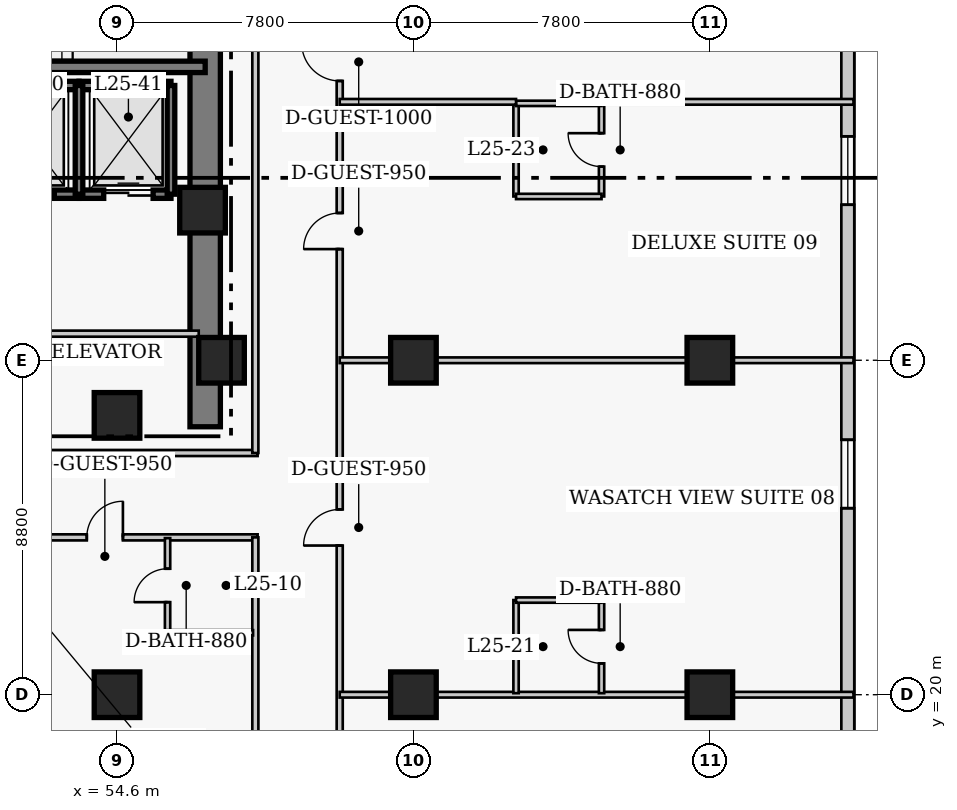
"""IFC4 building model, lengths in metres.
Left out: names, types, materials, properties, quantities, classifications, styles, units other than length and angle.
Written with IfcOpenShell. Run it as: python <this file> out.ifc"""

import sys

from ifc_helpers import new_model, si_unit, direction, frame, frame_2d, origin, origin_2d, place, context, subcontext, project, spatial, rectangle, extrude, element, fill, save


model = new_model("IFC4")
c1 = context("Model", 3, precision=1e-05, world=origin(), true_north=direction((0.0, 1.0)))
c2 = subcontext(c1, "Body", "Model", "MODEL_VIEW")
j1 = project(units=[si_unit("LENGTHUNIT", "METRE"), si_unit("PLANEANGLEUNIT", "RADIAN")], contexts=[c1])
p1 = place(None, origin())
s1 = spatial("IfcSite", under=j1, at=p1, CompositionType="ELEMENT")
p2 = place(p1, origin())
s2 = spatial("IfcBuilding", under=s1, at=p2, CompositionType="ELEMENT")
p3 = place(p2, frame((0.0, 0.0, 103.2)))
s3 = spatial("IfcBuildingStorey", under=s2, at=p3, CompositionType="ELEMENT", Elevation=103.2)
p4 = place(p3, frame((56.92, 27.05, 0.0), z_axis=(0.0, 0.0, 1.0), x_axis=(0.0, 1.0, 0.0)))
e1 = element("IfcWall", 1, at=p4, inside=s3, PredefinedType="SHEAR", context=c2, shape_type="SweptSolid", body=[
    extrude(rectangle(XDim=13.67, YDim=0.8, at=frame_2d((6.835, 0.0))), origin(), (0.0, 0.0, 1.0), 3.8),
])
p5 = place(p3, frame((48.45, 36.52, 0.0), z_axis=(0.0, 0.0, 1.0), x_axis=(1.0, 0.0, 0.0)))
e2 = element("IfcWall", 2, at=p5, inside=s3, PredefinedType="SHEAR", context=c2, shape_type="SweptSolid", body=[
    extrude(rectangle(XDim=8.47, YDim=0.3, at=frame_2d((4.235, 0.0))), origin(), (0.0, 0.0, 1.0), 3.8),
])
for number, where, z_axis, x_axis in (
    (3, (54.6, 20.0, 0.0), (0.0, 0.0, 1.0), (1.0, 0.0, 0.0)),
    (4, (62.4, 20.0, 0.0), (0.0, 0.0, 1.0), (1.0, 0.0, 0.0)),
    (5, (62.4, 28.8, 0.0), (0.0, 0.0, 1.0), (1.0, 0.0, 0.0)),
    (6, (70.2, 20.0, 0.0), (0.0, 0.0, 1.0), (1.0, 0.0, 0.0)),
    (7, (70.2, 28.8, 0.0), (0.0, 0.0, 1.0), (1.0, 0.0, 0.0)),
    (8, (57.35, 28.8, 0.0), (0.0, 0.0, 1.0), (1.0, 0.0, 0.0)),
    (9, (54.6, 27.35, 0.0), (0.0, 0.0, 1.0), (1.0, 0.0, 0.0)),
    (10, (56.85, 32.75, 0.0), (0.0, 0.0, 1.0), (1.0, 0.0, 0.0)),
):
    element("IfcColumn", number, at=place(p3, frame(where, z_axis=z_axis, x_axis=x_axis)), inside=s3, PredefinedType="COLUMN", context=c2, shape_type="SweptSolid", body=[
        extrude(rectangle(XDim=1.2, YDim=1.2, at=origin_2d()), origin(), (0.0, 0.0, 1.0), 3.8),
    ])
p6 = place(p3, frame((73.83, 13.83, 0.0), z_axis=(0.0, 0.0, 1.0), x_axis=(0.0, 1.0, 0.0)))
e11 = element("IfcWall", 11, at=p6, inside=s3, PredefinedType="SOLIDWALL", context=c2, shape_type="SweptSolid", body=[
    extrude(rectangle(XDim=31.94, YDim=0.34, at=frame_2d((15.97, 0.0))), origin(), (0.0, 0.0, 1.0), 3.54),
])
p7 = place(p6, frame((3.093, 0.0, 0.85)))
e12 = element("IfcOpeningElement", 12, at=p7, cuts=e11, PredefinedType="OPENING", context=c2, shape_type="SweptSolid", body=[
    extrude(rectangle(XDim=1.8, YDim=1.8, at=frame_2d((0.9, 0.9))), frame((0.0, 0.18, 0.0), z_axis=(0.0, -1.0, 0.0), x_axis=(1.0, 0.0, 0.0)), (0.0, 0.0, 1.0), 0.36),
])
p8 = place(p6, frame((11.077, 0.0, 0.85)))
e13 = element("IfcOpeningElement", 13, at=p8, cuts=e11, PredefinedType="OPENING", context=c2, shape_type="SweptSolid", body=[
    extrude(rectangle(XDim=1.8, YDim=1.8, at=frame_2d((0.9, 0.9))), frame((0.0, 0.18, 0.0), z_axis=(0.0, -1.0, 0.0), x_axis=(1.0, 0.0, 0.0)), (0.0, 0.0, 1.0), 0.36),
])
p9 = place(p6, frame((19.062, 0.0, 0.85)))
e14 = element("IfcOpeningElement", 14, at=p9, cuts=e11, PredefinedType="OPENING", context=c2, shape_type="SweptSolid", body=[
    extrude(rectangle(XDim=1.8, YDim=1.8, at=frame_2d((0.9, 0.9))), frame((0.0, 0.18, 0.0), z_axis=(0.0, -1.0, 0.0), x_axis=(1.0, 0.0, 0.0)), (0.0, 0.0, 1.0), 0.36),
])
p10 = place(p6, frame((27.048, 0.0, 0.85)))
e15 = element("IfcOpeningElement", 15, at=p10, cuts=e11, PredefinedType="OPENING", context=c2, shape_type="SweptSolid", body=[
    extrude(rectangle(XDim=1.8, YDim=1.8, at=frame_2d((0.9, 0.9))), frame((0.0, 0.18, 0.0), z_axis=(0.0, -1.0, 0.0), x_axis=(1.0, 0.0, 0.0)), (0.0, 0.0, 1.0), 0.36),
])
p11 = place(p3, frame((51.18, 36.03, 0.0), z_axis=(0.0, 0.0, 1.0), x_axis=(1.0, 0.0, 0.0)))
e16 = element("IfcWall", 16, at=p11, inside=s3, PredefinedType="SHEAR", context=c2, shape_type="SweptSolid", body=[
    extrude(rectangle(XDim=2.42, YDim=0.22, at=frame_2d((1.21, 0.0))), origin(), (0.0, 0.0, 1.0), 3.8),
])
p12 = place(p3, frame((51.18, 33.17, 0.0), z_axis=(0.0, 0.0, 1.0), x_axis=(1.0, 0.0, 0.0)))
e17 = element("IfcWall", 17, at=p12, inside=s3, PredefinedType="SHEAR", context=c2, shape_type="SweptSolid", body=[
    extrude(rectangle(XDim=2.42, YDim=0.22, at=frame_2d((1.21, 0.0))), origin(), (0.0, 0.0, 1.0), 3.8),
])
p13 = place(p12, frame((0.47, 0.0, 0.0)))
e18 = element("IfcOpeningElement", 18, at=p13, cuts=e17, PredefinedType="OPENING", context=c2, shape_type="SweptSolid", body=[
    extrude(rectangle(XDim=1.3, YDim=2.15, at=frame_2d((0.65, 1.075))), frame((0.0, 0.12, 0.0), z_axis=(0.0, -1.0, 0.0), x_axis=(1.0, 0.0, 0.0)), (0.0, 0.0, 1.0), 0.24),
])
p14 = place(p3, frame((53.6, 36.03, 0.0), z_axis=(0.0, 0.0, 1.0), x_axis=(1.0, 0.0, 0.0)))
e19 = element("IfcWall", 19, at=p14, inside=s3, PredefinedType="SHEAR", context=c2, shape_type="SweptSolid", body=[
    extrude(rectangle(XDim=2.42, YDim=0.22, at=frame_2d((1.21, 0.0))), origin(), (0.0, 0.0, 1.0), 3.8),
])
p15 = place(p3, frame((53.6, 33.17, 0.0), z_axis=(0.0, 0.0, 1.0), x_axis=(1.0, 0.0, 0.0)))
e20 = element("IfcWall", 20, at=p15, inside=s3, PredefinedType="SHEAR", context=c2, shape_type="SweptSolid", body=[
    extrude(rectangle(XDim=2.42, YDim=0.22, at=frame_2d((1.21, 0.0))), origin(), (0.0, 0.0, 1.0), 3.8),
])
p16 = place(p15, frame((0.65, 0.0, 0.0)))
e21 = element("IfcOpeningElement", 21, at=p16, cuts=e20, PredefinedType="OPENING", context=c2, shape_type="SweptSolid", body=[
    extrude(rectangle(XDim=1.3, YDim=2.15, at=frame_2d((0.65, 1.075))), frame((0.0, 0.12, 0.0), z_axis=(0.0, -1.0, 0.0), x_axis=(1.0, 0.0, 0.0)), (0.0, 0.0, 1.0), 0.24),
])
for number, where, z_axis, x_axis in (
    (22, (53.6, 33.17, 0.0), (0.0, 0.0, 1.0), (0.0, 1.0, 0.0)),
    (23, (56.02, 33.17, 0.0), (0.0, 0.0, 1.0), (0.0, 1.0, 0.0)),
):
    element("IfcWall", number, at=place(p3, frame(where, z_axis=z_axis, x_axis=x_axis)), inside=s3, PredefinedType="SHEAR", context=c2, shape_type="SweptSolid", body=[
        extrude(rectangle(XDim=2.86, YDim=0.2, at=frame_2d((1.43, 0.0))), origin(), (0.0, 0.0, 1.0), 3.8),
    ])
p17 = place(p3, frame((51.12, 29.5, 0.0), z_axis=(0.0, 0.0, 1.0), x_axis=(1.0, 0.0, 0.0)))
e24 = element("IfcWall", 24, at=p17, inside=s3, PredefinedType="PARTITIONING", context=c2, shape_type="SweptSolid", body=[
    extrude(rectangle(XDim=5.63, YDim=0.16, at=frame_2d((2.815, 0.0))), origin(), (0.0, 0.0, 1.0), 3.54),
])
p18 = place(p3, frame((35.85, 26.36, 0.0), z_axis=(0.0, 0.0, 1.0), x_axis=(1.0, 0.0, 0.0)))
e25 = element("IfcWall", 25, at=p18, inside=s3, PredefinedType="PARTITIONING", context=c2, shape_type="SweptSolid", body=[
    extrude(rectangle(XDim=22.45, YDim=0.16, at=frame_2d((11.225, 0.0))), origin(), (0.0, 0.0, 1.0), 3.54),
])
p19 = place(p3, frame((35.8, 24.14, 0.0), z_axis=(0.0, 0.0, 1.0), x_axis=(1.0, 0.0, 0.0)))
e26 = element("IfcWall", 26, at=p19, inside=s3, PredefinedType="PARTITIONING", context=c2, shape_type="SweptSolid", body=[
    extrude(rectangle(XDim=22.5, YDim=0.16, at=frame_2d((11.25, 0.0))), origin(), (0.0, 0.0, 1.0), 3.54),
])
p20 = place(p19, frame((2.305, 0.0, 0.0)))
e27 = element("IfcOpeningElement", 27, at=p20, cuts=e26, PredefinedType="OPENING", context=c2, shape_type="SweptSolid", body=[
    extrude(rectangle(XDim=1.0, YDim=2.15, at=frame_2d((0.5, 1.075))), frame((0.0, 0.09, 0.0), z_axis=(0.0, -1.0, 0.0), x_axis=(1.0, 0.0, 0.0)), (0.0, 0.0, 1.0), 0.18),
])
p21 = place(p19, frame((9.095, 0.0, 0.0)))
e28 = element("IfcOpeningElement", 28, at=p21, cuts=e26, PredefinedType="OPENING", context=c2, shape_type="SweptSolid", body=[
    extrude(rectangle(XDim=0.95, YDim=2.1, at=frame_2d((0.475, 1.05))), frame((0.0, 0.09, 0.0), z_axis=(0.0, -1.0, 0.0), x_axis=(1.0, 0.0, 0.0)), (0.0, 0.0, 1.0), 0.18),
])
p22 = place(p19, frame((12.395, 0.0, 0.0)))
e29 = element("IfcOpeningElement", 29, at=p22, cuts=e26, PredefinedType="OPENING", context=c2, shape_type="SweptSolid", body=[
    extrude(rectangle(XDim=0.95, YDim=2.1, at=frame_2d((0.475, 1.05))), frame((0.0, 0.09, 0.0), z_axis=(0.0, -1.0, 0.0), x_axis=(1.0, 0.0, 0.0)), (0.0, 0.0, 1.0), 0.18),
])
p23 = place(p19, frame((18.005, 0.0, 0.0)))
e30 = element("IfcOpeningElement", 30, at=p23, cuts=e26, PredefinedType="OPENING", context=c2, shape_type="SweptSolid", body=[
    extrude(rectangle(XDim=0.95, YDim=2.1, at=frame_2d((0.475, 1.05))), frame((0.0, 0.09, 0.0), z_axis=(0.0, -1.0, 0.0), x_axis=(1.0, 0.0, 0.0)), (0.0, 0.0, 1.0), 0.18),
])
p24 = place(p3, frame((60.46, 11.85, 0.0), z_axis=(0.0, 0.0, 1.0), x_axis=(0.0, 1.0, 0.0)))
e31 = element("IfcWall", 31, at=p24, inside=s3, PredefinedType="PARTITIONING", context=c2, shape_type="SweptSolid", body=[
    extrude(rectangle(XDim=28.8, YDim=0.16, at=frame_2d((14.4, 0.0))), origin(), (0.0, 0.0, 1.0), 3.54),
])
p25 = place(p24, frame((3.6, 0.0, 0.0)))
e32 = element("IfcOpeningElement", 32, at=p25, cuts=e31, PredefinedType="OPENING", context=c2, shape_type="SweptSolid", body=[
    extrude(rectangle(XDim=0.95, YDim=2.1, at=frame_2d((0.475, 1.05))), frame((0.0, 0.09, 0.0), z_axis=(0.0, -1.0, 0.0), x_axis=(1.0, 0.0, 0.0)), (0.0, 0.0, 1.0), 0.18),
])
p26 = place(p24, frame((12.075, 0.0, 0.0)))
e33 = element("IfcOpeningElement", 33, at=p26, cuts=e31, PredefinedType="OPENING", context=c2, shape_type="SweptSolid", body=[
    extrude(rectangle(XDim=0.95, YDim=2.1, at=frame_2d((0.475, 1.05))), frame((0.0, 0.09, 0.0), z_axis=(0.0, -1.0, 0.0), x_axis=(1.0, 0.0, 0.0)), (0.0, 0.0, 1.0), 0.18),
])
p27 = place(p24, frame((19.875, 0.0, 0.0)))
e34 = element("IfcOpeningElement", 34, at=p27, cuts=e31, PredefinedType="OPENING", context=c2, shape_type="SweptSolid", body=[
    extrude(rectangle(XDim=0.95, YDim=2.1, at=frame_2d((0.475, 1.05))), frame((0.0, 0.09, 0.0), z_axis=(0.0, -1.0, 0.0), x_axis=(1.0, 0.0, 0.0)), (0.0, 0.0, 1.0), 0.18),
])
p28 = place(p24, frame((24.3, 0.0, 0.0)))
e35 = element("IfcOpeningElement", 35, at=p28, cuts=e31, PredefinedType="OPENING", context=c2, shape_type="SweptSolid", body=[
    extrude(rectangle(XDim=1.0, YDim=2.15, at=frame_2d((0.5, 1.075))), frame((0.0, 0.09, 0.0), z_axis=(0.0, -1.0, 0.0), x_axis=(1.0, 0.0, 0.0)), (0.0, 0.0, 1.0), 0.18),
])
p29 = place(p3, frame((58.24, 26.36, 0.0), z_axis=(0.0, 0.0, 1.0), x_axis=(0.0, 1.0, 0.0)))
e36 = element("IfcWall", 36, at=p29, inside=s3, PredefinedType="PARTITIONING", context=c2, shape_type="SweptSolid", body=[
    extrude(rectangle(XDim=14.29, YDim=0.16, at=frame_2d((7.145, 0.0))), origin(), (0.0, 0.0, 1.0), 3.54),
])
p30 = place(p3, frame((58.24, 11.85, 0.0), z_axis=(0.0, 0.0, 1.0), x_axis=(0.0, 1.0, 0.0)))
e37 = element("IfcWall", 37, at=p30, inside=s3, PredefinedType="PARTITIONING", context=c2, shape_type="SweptSolid", body=[
    extrude(rectangle(XDim=12.29, YDim=0.16, at=frame_2d((6.145, 0.0))), origin(), (0.0, 0.0, 1.0), 3.54),
])
p31 = place(p3, frame((55.93, 21.63, 0.0), z_axis=(0.0, 0.0, 1.0), x_axis=(0.0, 1.0, 0.0)))
e38 = element("IfcWall", 38, at=p31, inside=s3, PredefinedType="PLUMBINGWALL", context=c2, shape_type="SweptSolid", body=[
    extrude(rectangle(XDim=2.49, YDim=0.14, at=frame_2d((1.245, 0.0))), origin(), (0.0, 0.0, 1.0), 3.54),
])
p32 = place(p31, frame((0.805, 0.0, 0.0)))
e39 = element("IfcOpeningElement", 39, at=p32, cuts=e38, PredefinedType="OPENING", context=c2, shape_type="SweptSolid", body=[
    extrude(rectangle(XDim=0.88, YDim=2.05, at=frame_2d((0.44, 1.025))), frame((0.0, 0.08, 0.0), z_axis=(0.0, -1.0, 0.0), x_axis=(1.0, 0.0, 0.0)), (0.0, 0.0, 1.0), 0.16),
])
p33 = place(p3, frame((55.93, 21.63, 0.0), z_axis=(0.0, 0.0, 1.0), x_axis=(1.0, 0.0, 0.0)))
e40 = element("IfcWall", 40, at=p33, inside=s3, PredefinedType="PLUMBINGWALL", context=c2, shape_type="SweptSolid", body=[
    extrude(rectangle(XDim=2.25, YDim=0.14, at=frame_2d((1.125, 0.0))), origin(), (0.0, 0.0, 1.0), 3.54),
])
p34 = place(p3, frame((60.46, 20.0, 0.0), z_axis=(0.0, 0.0, 1.0), x_axis=(1.0, 0.0, 0.0)))
e41 = element("IfcWall", 41, at=p34, inside=s3, PredefinedType="PARTITIONING", context=c2, shape_type="SweptSolid", body=[
    extrude(rectangle(XDim=13.52, YDim=0.15, at=frame_2d((6.76, 0.0))), origin(), (0.0, 0.0, 1.0), 2.679),
])
p35 = place(p3, frame((65.1, 20.04, 0.0), z_axis=(0.0, 0.0, 1.0), x_axis=(0.0, 1.0, 0.0)))
e42 = element("IfcWall", 42, at=p35, inside=s3, PredefinedType="PLUMBINGWALL", context=c2, shape_type="SweptSolid", body=[
    extrude(rectangle(XDim=2.45, YDim=0.14, at=frame_2d((1.225, 0.0))), origin(), (0.0, 0.0, 1.0), 3.54),
])
p36 = place(p3, frame((67.35, 20.04, 0.0), z_axis=(0.0, 0.0, 1.0), x_axis=(0.0, 1.0, 0.0)))
e43 = element("IfcWall", 43, at=p36, inside=s3, PredefinedType="PLUMBINGWALL", context=c2, shape_type="SweptSolid", body=[
    extrude(rectangle(XDim=2.45, YDim=0.14, at=frame_2d((1.225, 0.0))), origin(), (0.0, 0.0, 1.0), 3.54),
])
p37 = place(p36, frame((0.785, 0.0, 0.0)))
e44 = element("IfcOpeningElement", 44, at=p37, cuts=e43, PredefinedType="OPENING", context=c2, shape_type="SweptSolid", body=[
    extrude(rectangle(XDim=0.88, YDim=2.05, at=frame_2d((0.44, 1.025))), frame((0.0, 0.08, 0.0), z_axis=(0.0, -1.0, 0.0), x_axis=(1.0, 0.0, 0.0)), (0.0, 0.0, 1.0), 0.16),
])
p38 = place(p3, frame((65.1, 22.49, 0.0), z_axis=(0.0, 0.0, 1.0), x_axis=(1.0, 0.0, 0.0)))
e45 = element("IfcWall", 45, at=p38, inside=s3, PredefinedType="PLUMBINGWALL", context=c2, shape_type="SweptSolid", body=[
    extrude(rectangle(XDim=2.25, YDim=0.14, at=frame_2d((1.125, 0.0))), origin(), (0.0, 0.0, 1.0), 3.54),
])
p39 = place(p3, frame((60.46, 28.8, 0.0), z_axis=(0.0, 0.0, 1.0), x_axis=(1.0, 0.0, 0.0)))
e46 = element("IfcWall", 46, at=p39, inside=s3, PredefinedType="PARTITIONING", context=c2, shape_type="SweptSolid", body=[
    extrude(rectangle(XDim=13.52, YDim=0.15, at=frame_2d((6.76, 0.0))), origin(), (0.0, 0.0, 1.0), 2.679),
])
p40 = place(p3, frame((65.1, 33.11, 0.0), z_axis=(0.0, 0.0, 1.0), x_axis=(0.0, 1.0, 0.0)))
e47 = element("IfcWall", 47, at=p40, inside=s3, PredefinedType="PLUMBINGWALL", context=c2, shape_type="SweptSolid", body=[
    extrude(rectangle(XDim=2.45, YDim=0.14, at=frame_2d((1.225, 0.0))), origin(), (0.0, 0.0, 1.0), 3.54),
])
p41 = place(p3, frame((67.35, 33.11, 0.0), z_axis=(0.0, 0.0, 1.0), x_axis=(0.0, 1.0, 0.0)))
e48 = element("IfcWall", 48, at=p41, inside=s3, PredefinedType="PLUMBINGWALL", context=c2, shape_type="SweptSolid", body=[
    extrude(rectangle(XDim=2.45, YDim=0.14, at=frame_2d((1.225, 0.0))), origin(), (0.0, 0.0, 1.0), 3.54),
])
p42 = place(p41, frame((0.785, 0.0, 0.0)))
e49 = element("IfcOpeningElement", 49, at=p42, cuts=e48, PredefinedType="OPENING", context=c2, shape_type="SweptSolid", body=[
    extrude(rectangle(XDim=0.88, YDim=2.05, at=frame_2d((0.44, 1.025))), frame((0.0, 0.08, 0.0), z_axis=(0.0, -1.0, 0.0), x_axis=(1.0, 0.0, 0.0)), (0.0, 0.0, 1.0), 0.16),
])
for number, where, z_axis, x_axis in (
    (50, (65.1, 33.11, 0.0), (0.0, 0.0, 1.0), (1.0, 0.0, 0.0)),
    (51, (65.1, 35.56, 0.0), (0.0, 0.0, 1.0), (1.0, 0.0, 0.0)),
):
    element("IfcWall", number, at=place(p3, frame(where, z_axis=z_axis, x_axis=x_axis)), inside=s3, PredefinedType="PLUMBINGWALL", context=c2, shape_type="SweptSolid", body=[
        extrude(rectangle(XDim=2.25, YDim=0.14, at=frame_2d((1.125, 0.0))), origin(), (0.0, 0.0, 1.0), 3.54),
    ])
p43 = place(p3, frame((60.46, 35.6, 0.0), z_axis=(0.0, 0.0, 1.0), x_axis=(1.0, 0.0, 0.0)))
e52 = element("IfcWall", 52, at=p43, inside=s3, PredefinedType="PARTITIONING", context=c2, shape_type="SweptSolid", body=[
    extrude(rectangle(XDim=4.64, YDim=0.15, at=frame_2d((2.32, 0.0))), origin(), (0.0, 0.0, 1.0), 3.54),
])
p44 = place(p3, frame((67.35, 35.6, 0.0), z_axis=(0.0, 0.0, 1.0), x_axis=(1.0, 0.0, 0.0)))
e53 = element("IfcWall", 53, at=p44, inside=s3, PredefinedType="PARTITIONING", context=c2, shape_type="SweptSolid", body=[
    extrude(rectangle(XDim=6.63, YDim=0.15, at=frame_2d((3.315, 0.0))), origin(), (0.0, 0.0, 1.0), 3.54),
])
p45 = place(p8, origin())
e54 = element("IfcWindow", 54, at=p45, inside=s3, PartitioningType="SINGLE_PANEL", PredefinedType="WINDOW", context=c2, shape_type="SweptSolid", body=[
    extrude(rectangle(XDim=1.8, YDim=1.8, at=frame_2d((0.9, 0.9))), frame((0.0, 0.03, 0.0), z_axis=(0.0, -1.0, 0.0), x_axis=(1.0, 0.0, 0.0)), (0.0, 0.0, 1.0), 0.06),
])
fill(e13, e54)
p46 = place(p9, origin())
e55 = element("IfcWindow", 55, at=p46, inside=s3, PartitioningType="SINGLE_PANEL", PredefinedType="WINDOW", context=c2, shape_type="SweptSolid", body=[
    extrude(rectangle(XDim=1.8, YDim=1.8, at=frame_2d((0.9, 0.9))), frame((0.0, 0.03, 0.0), z_axis=(0.0, -1.0, 0.0), x_axis=(1.0, 0.0, 0.0)), (0.0, 0.0, 1.0), 0.06),
])
fill(e14, e55)
p47 = place(p13, origin())
e56 = element("IfcDoor", 56, at=p47, inside=s3, OperationType="DOUBLE_DOOR_SLIDING", PredefinedType="DOOR", context=c2, shape_type="SweptSolid", body=[
    extrude(rectangle(XDim=1.3, YDim=2.15, at=frame_2d((0.65, 1.075))), frame((0.0, 0.025, 0.0), z_axis=(0.0, -1.0, 0.0), x_axis=(1.0, 0.0, 0.0)), (0.0, 0.0, 1.0), 0.05),
])
fill(e18, e56)
p48 = place(p16, origin())
e57 = element("IfcDoor", 57, at=p48, inside=s3, OperationType="DOUBLE_DOOR_SLIDING", PredefinedType="DOOR", context=c2, shape_type="SweptSolid", body=[
    extrude(rectangle(XDim=1.3, YDim=2.15, at=frame_2d((0.65, 1.075))), frame((0.0, 0.025, 0.0), z_axis=(0.0, -1.0, 0.0), x_axis=(1.0, 0.0, 0.0)), (0.0, 0.0, 1.0), 0.05),
])
fill(e21, e57)
p49 = place(p32, origin())
e58 = element("IfcDoor", 58, at=p49, inside=s3, OperationType="SINGLE_SWING_LEFT", PredefinedType="DOOR", context=c2, shape_type="SweptSolid", body=[
    extrude(rectangle(XDim=0.88, YDim=2.05, at=frame_2d((0.44, 1.025))), frame((0.0, 0.025, 0.0), z_axis=(0.0, -1.0, 0.0), x_axis=(1.0, 0.0, 0.0)), (0.0, 0.0, 1.0), 0.05),
])
fill(e39, e58)
p50 = place(p23, origin())
e59 = element("IfcDoor", 59, at=p50, inside=s3, OperationType="SINGLE_SWING_RIGHT", PredefinedType="DOOR", context=c2, shape_type="SweptSolid", body=[
    extrude(rectangle(XDim=0.95, YDim=2.1, at=frame_2d((0.475, 1.05))), frame((0.0, 0.025, 0.0), z_axis=(0.0, -1.0, 0.0), x_axis=(1.0, 0.0, 0.0)), (0.0, 0.0, 1.0), 0.05),
])
fill(e30, e59)
p51 = place(p37, origin())
e60 = element("IfcDoor", 60, at=p51, inside=s3, OperationType="SINGLE_SWING_RIGHT", PredefinedType="DOOR", context=c2, shape_type="SweptSolid", body=[
    extrude(rectangle(XDim=0.88, YDim=2.05, at=frame_2d((0.44, 1.025))), frame((0.0, 0.025, 0.0), z_axis=(0.0, -1.0, 0.0), x_axis=(1.0, 0.0, 0.0)), (0.0, 0.0, 1.0), 0.05),
])
fill(e44, e60)
p52 = place(p26, origin())
e61 = element("IfcDoor", 61, at=p52, inside=s3, OperationType="SINGLE_SWING_LEFT", PredefinedType="DOOR", context=c2, shape_type="SweptSolid", body=[
    extrude(rectangle(XDim=0.95, YDim=2.1, at=frame_2d((0.475, 1.05))), frame((0.0, 0.025, 0.0), z_axis=(0.0, -1.0, 0.0), x_axis=(1.0, 0.0, 0.0)), (0.0, 0.0, 1.0), 0.05),
])
fill(e33, e61)
p53 = place(p42, origin())
e62 = element("IfcDoor", 62, at=p53, inside=s3, OperationType="SINGLE_SWING_RIGHT", PredefinedType="DOOR", context=c2, shape_type="SweptSolid", body=[
    extrude(rectangle(XDim=0.88, YDim=2.05, at=frame_2d((0.44, 1.025))), frame((0.0, 0.025, 0.0), z_axis=(0.0, -1.0, 0.0), x_axis=(1.0, 0.0, 0.0)), (0.0, 0.0, 1.0), 0.05),
])
fill(e49, e62)
p54 = place(p27, origin())
e63 = element("IfcDoor", 63, at=p54, inside=s3, OperationType="SINGLE_SWING_LEFT", PredefinedType="DOOR", context=c2, shape_type="SweptSolid", body=[
    extrude(rectangle(XDim=0.95, YDim=2.1, at=frame_2d((0.475, 1.05))), frame((0.0, 0.025, 0.0), z_axis=(0.0, -1.0, 0.0), x_axis=(1.0, 0.0, 0.0)), (0.0, 0.0, 1.0), 0.05),
])
fill(e34, e63)
p55 = place(p28, origin())
e64 = element("IfcDoor", 64, at=p55, inside=s3, OperationType="SINGLE_SWING_RIGHT", PredefinedType="DOOR", context=c2, shape_type="SweptSolid", body=[
    extrude(rectangle(XDim=1.0, YDim=2.15, at=frame_2d((0.5, 1.075))), frame((0.0, 0.025, 0.0), z_axis=(0.0, -1.0, 0.0), x_axis=(1.0, 0.0, 0.0)), (0.0, 0.0, 1.0), 0.05),
])
fill(e35, e64)
save(model, sys.argv[1])
